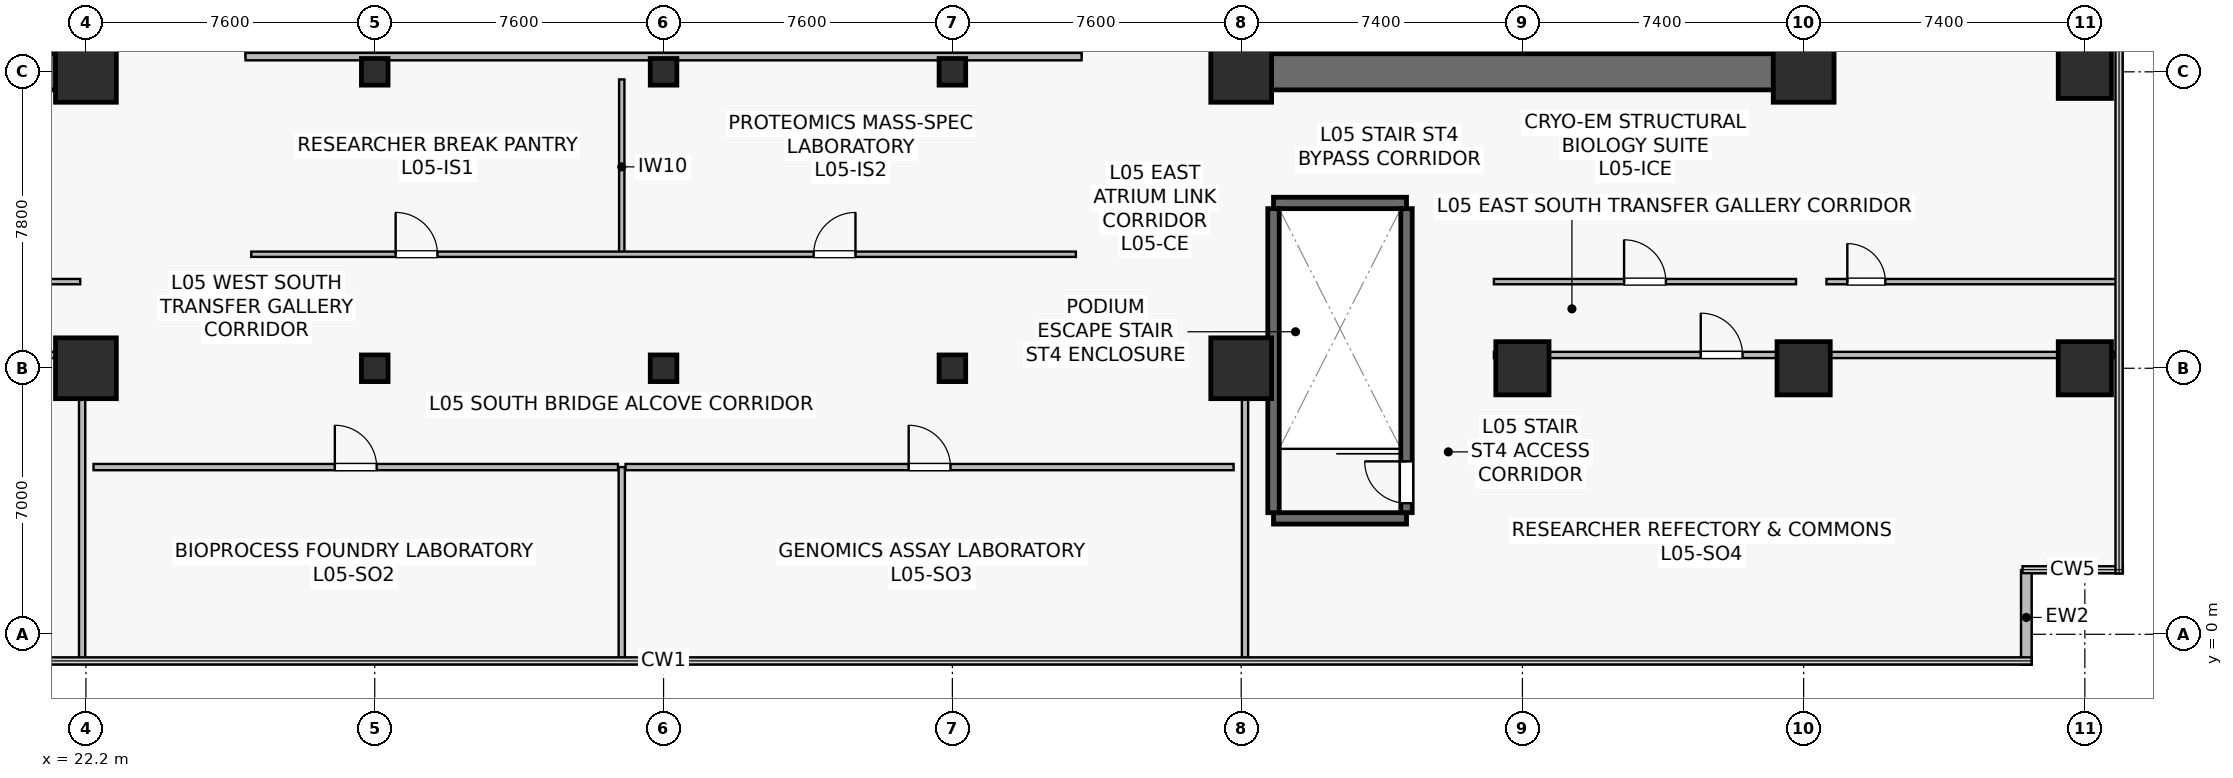
"""IFC4 building model, lengths in metres.
Left out: names, types, materials, properties, quantities, classifications, styles, units other than length and angle.
Written with IfcOpenShell. Run it as: python <this file> out.ifc"""

import sys

from ifc_helpers import new_model, si_unit, direction, frame, frame_2d, origin, origin_2d, place, context, subcontext, project, spatial, rectangle, hollow_rectangle, extrude, source, transform, mapped, element, fill, save


model = new_model("IFC4")
c1 = context("Model", 3, precision=1e-05, world=origin(), true_north=direction((0.0, 1.0)))
c2 = subcontext(c1, "Body", "Model", "MODEL_VIEW")
j1 = project(units=[si_unit("LENGTHUNIT", "METRE"), si_unit("PLANEANGLEUNIT", "RADIAN")], contexts=[c1])
p1 = place(None, origin())
s1 = spatial("IfcSite", under=j1, at=p1, CompositionType="ELEMENT")
p2 = place(p1, origin())
s2 = spatial("IfcBuilding", under=s1, at=p2, CompositionType="ELEMENT")
p3 = place(p2, frame((0.0, 0.0, 19.8)))
s3 = spatial("IfcBuildingStorey", under=s2, at=p3, CompositionType="ELEMENT", Elevation=19.8)
p4 = place(p3, frame((6.925, 14.8, 0.0), z_axis=(0.0, 0.0, 1.0), x_axis=(1.0, 0.0, 0.0)))
e1 = element("IfcWall", 1, at=p4, inside=s3, PredefinedType="SHEAR", context=c2, shape_type="SweptSolid", body=[
    extrude(rectangle(XDim=15.75, YDim=0.95, at=frame_2d((7.875, 0.0))), origin(), (0.0, 0.0, 1.0), 5.08),
])
p5 = place(p3, frame((22.2, 15.275, 0.0), z_axis=(0.0, 0.0, 1.0), x_axis=(0.0, 1.0, 0.0)))
e2 = element("IfcWall", 2, at=p5, inside=s3, PredefinedType="SHEAR", context=c2, shape_type="SweptSolid", body=[
    extrude(rectangle(XDim=18.05, YDim=0.95, at=frame_2d((9.025, 0.0))), origin(), (0.0, 0.0, 1.0), 5.08),
])
p6 = place(p5, frame((3.275, 0.0, 0.0)))
e3 = element("IfcOpeningElement", 3, at=p6, cuts=e2, PredefinedType="OPENING", context=c2, shape_type="SweptSolid", body=[
    extrude(rectangle(XDim=1.42, YDim=2.2, at=frame_2d((0.71, 1.1))), frame((0.0, 0.485, 0.0), z_axis=(0.0, -1.0, 0.0), x_axis=(1.0, 0.0, 0.0)), (0.0, 0.0, 1.0), 0.97),
])
p7 = place(p3, frame((52.125, 14.8, 0.0), z_axis=(0.0, 0.0, 1.0), x_axis=(1.0, 0.0, 0.0)))
e4 = element("IfcWall", 4, at=p7, inside=s3, PredefinedType="SHEAR", context=c2, shape_type="SweptSolid", body=[
    extrude(rectangle(XDim=15.75, YDim=0.95, at=frame_2d((7.875, 0.0))), origin(), (0.0, 0.0, 1.0), 5.08),
])
p8 = place(p3, frame((52.6, 15.275, 0.0), z_axis=(0.0, 0.0, 1.0), x_axis=(0.0, 1.0, 0.0)))
e5 = element("IfcWall", 5, at=p8, inside=s3, PredefinedType="SHEAR", context=c2, shape_type="SweptSolid", body=[
    extrude(rectangle(XDim=18.05, YDim=0.95, at=frame_2d((9.025, 0.0))), origin(), (0.0, 0.0, 1.0), 5.08),
])
p9 = place(p8, frame((3.275, 0.0, 0.0)))
e6 = element("IfcOpeningElement", 6, at=p9, cuts=e5, PredefinedType="OPENING", context=c2, shape_type="SweptSolid", body=[
    extrude(rectangle(XDim=1.42, YDim=2.2, at=frame_2d((0.71, 1.1))), frame((0.0, 0.485, 0.0), z_axis=(0.0, -1.0, 0.0), x_axis=(1.0, 0.0, 0.0)), (0.0, 0.0, 1.0), 0.97),
])
p10 = place(p3, frame((67.4, 15.275, 0.0), z_axis=(0.0, 0.0, 1.0), x_axis=(0.0, 1.0, 0.0)))
e7 = element("IfcWall", 7, at=p10, inside=s3, PredefinedType="SHEAR", context=c2, shape_type="SweptSolid", body=[
    extrude(rectangle(XDim=18.05, YDim=0.95, at=frame_2d((9.025, 0.0))), origin(), (0.0, 0.0, 1.0), 5.08),
])
for number, where, z_axis, x_axis in (
    (8, (53.45, 3.05, 0.0), (0.0, 0.0, 1.0), (1.0, 0.0, 0.0)),
    (9, (53.45, 11.35, 0.0), (0.0, 0.0, 1.0), (1.0, 0.0, 0.0)),
):
    element("IfcWall", number, at=place(p3, frame(where, z_axis=z_axis, x_axis=x_axis)), inside=s3, PredefinedType="SHEAR", context=c2, shape_type="SweptSolid", body=[
        extrude(rectangle(XDim=3.5, YDim=0.3, at=frame_2d((1.75, 0.0))), origin(), (0.0, 0.0, 1.0), 5.08),
    ])
p11 = place(p3, frame((53.45, 3.2, 0.0), z_axis=(0.0, 0.0, 1.0), x_axis=(0.0, 1.0, 0.0)))
e10 = element("IfcWall", 10, at=p11, inside=s3, PredefinedType="SHEAR", context=c2, shape_type="SweptSolid", body=[
    extrude(rectangle(XDim=8.0, YDim=0.3, at=frame_2d((4.0, 0.0))), origin(), (0.0, 0.0, 1.0), 5.08),
])
p12 = place(p3, frame((56.95, 3.2, 0.0), z_axis=(0.0, 0.0, 1.0), x_axis=(0.0, 1.0, 0.0)))
e11 = element("IfcWall", 11, at=p12, inside=s3, PredefinedType="SHEAR", context=c2, shape_type="SweptSolid", body=[
    extrude(rectangle(XDim=8.0, YDim=0.3, at=frame_2d((4.0, 0.0))), origin(), (0.0, 0.0, 1.0), 5.08),
])
p13 = place(p12, frame((0.25, 0.0, 0.0)))
e12 = element("IfcOpeningElement", 12, at=p13, cuts=e11, PredefinedType="OPENING", context=c2, shape_type="SweptSolid", body=[
    extrude(rectangle(XDim=1.1, YDim=2.15, at=frame_2d((0.55, 1.075))), frame((0.0, 0.16, 0.0), z_axis=(0.0, -1.0, 0.0), x_axis=(1.0, 0.0, 0.0)), (0.0, 0.0, 1.0), 0.32),
])
m1 = source(origin(), c2, "Body", "SweptSolid", [
    extrude(rectangle(XDim=1.6, YDim=1.6, at=origin_2d()), origin(), (0.0, 0.0, 1.0), 5.4),
])
for number, where, z_axis, x_axis in (
    (13, (22.2, 7.0, 0.0), (0.0, 0.0, 1.0), (1.0, 0.0, 0.0)),
    (14, (22.2, 14.8, 0.0), (0.0, 0.0, 1.0), (1.0, 0.0, 0.0)),
    (15, (52.6, 7.0, 0.0), (0.0, 0.0, 1.0), (1.0, 0.0, 0.0)),
):
    element("IfcColumn", number, at=place(p3, frame(where, z_axis=z_axis, x_axis=x_axis)), inside=s3, PredefinedType="COLUMN", context=c2, shape_type="MappedRepresentation", body=[
        mapped(m1, transform((0.0, 0.0, 0.0), scale=1.0)),
    ])
m2 = source(origin(), c2, "Body", "SweptSolid", [
    extrude(rectangle(XDim=1.4, YDim=1.4, at=origin_2d()), origin(), (0.0, 0.0, 1.0), 5.4),
])
p14 = place(p3, frame((60.0, 7.0, 0.0), z_axis=(0.0, 0.0, 1.0), x_axis=(1.0, 0.0, 0.0)))
e16 = element("IfcColumn", 16, at=p14, inside=s3, PredefinedType="COLUMN", context=c2, shape_type="MappedRepresentation", body=[
    mapped(m2, transform((0.0, 0.0, 0.0), scale=1.0)),
])
for number, where, z_axis, x_axis in (
    (17, (52.6, 14.8, 0.0), (0.0, 0.0, 1.0), (1.0, 0.0, 0.0)),
    (18, (67.4, 14.8, 0.0), (0.0, 0.0, 1.0), (1.0, 0.0, 0.0)),
):
    element("IfcColumn", number, at=place(p3, frame(where, z_axis=z_axis, x_axis=x_axis)), inside=s3, PredefinedType="COLUMN", context=c2, shape_type="MappedRepresentation", body=[
        mapped(m1, transform((0.0, 0.0, 0.0), scale=1.0)),
    ])
for number, where, z_axis, x_axis in (
    (19, (67.4, 7.0, 0.0), (0.0, 0.0, 1.0), (1.0, 0.0, 0.0)),
    (20, (74.8, 7.0, 0.0), (0.0, 0.0, 1.0), (1.0, 0.0, 0.0)),
    (21, (74.8, 14.8, 0.0), (0.0, 0.0, 1.0), (1.0, 0.0, 0.0)),
):
    element("IfcColumn", number, at=place(p3, frame(where, z_axis=z_axis, x_axis=x_axis)), inside=s3, PredefinedType="COLUMN", context=c2, shape_type="MappedRepresentation", body=[
        mapped(m2, transform((0.0, 0.0, 0.0), scale=1.0)),
    ])
m3 = source(origin(), c2, "Body", "SweptSolid", [
    extrude(hollow_rectangle(XDim=0.7, YDim=0.7, WallThickness=0.032, at=origin_2d()), origin(), (0.0, 0.0, 1.0), 5.4),
])
for number, where, z_axis, x_axis in (
    (22, (29.8, 7.0, 0.0), (0.0, 0.0, 1.0), (1.0, 0.0, 0.0)),
    (23, (29.8, 14.8, 0.0), (0.0, 0.0, 1.0), (1.0, 0.0, 0.0)),
    (24, (37.4, 7.0, 0.0), (0.0, 0.0, 1.0), (1.0, 0.0, 0.0)),
    (25, (37.4, 14.8, 0.0), (0.0, 0.0, 1.0), (1.0, 0.0, 0.0)),
    (26, (45.0, 7.0, 0.0), (0.0, 0.0, 1.0), (1.0, 0.0, 0.0)),
    (27, (45.0, 14.8, 0.0), (0.0, 0.0, 1.0), (1.0, 0.0, 0.0)),
):
    element("IfcColumn", number, at=place(p3, frame(where, z_axis=z_axis, x_axis=x_axis)), inside=s3, PredefinedType="COLUMN", context=c2, shape_type="MappedRepresentation", body=[
        mapped(m3, transform((0.0, 0.0, 0.0), scale=1.0)),
    ])
p15 = place(p3, frame((73.26, -0.8, 0.0), z_axis=(0.0, 0.0, 1.0), x_axis=(0.0, 1.0, 0.0)))
e28 = element("IfcWall", 28, at=p15, inside=s3, PredefinedType="STANDARD", context=c2, shape_type="SweptSolid", body=[
    extrude(rectangle(XDim=2.488, YDim=0.28, at=frame_2d((1.244, 0.0))), origin(), (0.0, 0.0, 1.0), 5.08),
])
p16 = place(p3, frame((26.5, 15.2, 0.0), z_axis=(0.0, 0.0, 1.0), x_axis=(0.0, 1.0, 0.0)))
e29 = element("IfcWall", 29, at=p16, inside=s3, PredefinedType="SOLIDWALL", context=c2, shape_type="SweptSolid", body=[
    extrude(rectangle(XDim=18.2, YDim=0.195, at=frame_2d((9.1, 0.0))), origin(), (0.0, 0.0, 1.0), 5.08),
])
p17 = place(p16, frame((1.8, 0.0, 0.9)))
e30 = element("IfcOpeningElement", 30, at=p17, cuts=e29, PredefinedType="OPENING", context=c2, shape_type="SweptSolid", body=[
    extrude(rectangle(XDim=1.2, YDim=1.35, at=frame_2d((0.6, 0.675))), frame((0.0, 0.107, 0.0), z_axis=(0.0, -1.0, 0.0), x_axis=(1.0, 0.0, 0.0)), (0.0, 0.0, 1.0), 0.215),
])
p18 = place(p16, frame((13.2, 0.0, 0.9)))
e31 = element("IfcOpeningElement", 31, at=p18, cuts=e29, PredefinedType="OPENING", context=c2, shape_type="SweptSolid", body=[
    extrude(rectangle(XDim=1.2, YDim=1.35, at=frame_2d((0.6, 0.675))), frame((0.0, 0.107, 0.0), z_axis=(0.0, -1.0, 0.0), x_axis=(1.0, 0.0, 0.0)), (0.0, 0.0, 1.0), 0.215),
])
p19 = place(p3, frame((48.3, 15.2, 0.0), z_axis=(0.0, 0.0, 1.0), x_axis=(0.0, 1.0, 0.0)))
e32 = element("IfcWall", 32, at=p19, inside=s3, PredefinedType="SOLIDWALL", context=c2, shape_type="SweptSolid", body=[
    extrude(rectangle(XDim=18.2, YDim=0.195, at=frame_2d((9.1, 0.0))), origin(), (0.0, 0.0, 1.0), 5.08),
])
p20 = place(p19, frame((1.8, 0.0, 0.9)))
e33 = element("IfcOpeningElement", 33, at=p20, cuts=e32, PredefinedType="OPENING", context=c2, shape_type="SweptSolid", body=[
    extrude(rectangle(XDim=1.2, YDim=1.35, at=frame_2d((0.6, 0.675))), frame((0.0, 0.107, 0.0), z_axis=(0.0, -1.0, 0.0), x_axis=(1.0, 0.0, 0.0)), (0.0, 0.0, 1.0), 0.215),
])
p21 = place(p19, frame((13.2, 0.0, 0.9)))
e34 = element("IfcOpeningElement", 34, at=p21, cuts=e32, PredefinedType="OPENING", context=c2, shape_type="SweptSolid", body=[
    extrude(rectangle(XDim=1.2, YDim=1.35, at=frame_2d((0.6, 0.675))), frame((0.0, 0.107, 0.0), z_axis=(0.0, -1.0, 0.0), x_axis=(1.0, 0.0, 0.0)), (0.0, 0.0, 1.0), 0.215),
])
p22 = place(p3, frame((26.4, 15.2, 0.0), z_axis=(0.0, 0.0, 1.0), x_axis=(1.0, 0.0, 0.0)))
e35 = element("IfcWall", 35, at=p22, inside=s3, PredefinedType="SOLIDWALL", context=c2, shape_type="SweptSolid", body=[
    extrude(rectangle(XDim=22.0, YDim=0.195, at=frame_2d((11.0, 0.0))), origin(), (0.0, 0.0, 1.0), 5.08),
])
p23 = place(p3, frame((6.6, 7.35, 0.0), z_axis=(0.0, 0.0, 1.0), x_axis=(1.0, 0.0, 0.0)))
e36 = element("IfcWall", 36, at=p23, inside=s3, PredefinedType="PARTITIONING", context=c2, shape_type="SweptSolid", body=[
    extrude(rectangle(XDim=15.2, YDim=0.165, at=frame_2d((7.6, 0.0))), origin(), (0.0, 0.0, 1.0), 4.365),
])
p24 = place(p23, frame((5.04, 0.0, 0.0)))
e37 = element("IfcOpeningElement", 37, at=p24, cuts=e36, PredefinedType="OPENING", context=c2, shape_type="SweptSolid", body=[
    extrude(rectangle(XDim=1.1, YDim=2.18, at=frame_2d((0.55, 1.09))), frame((0.0, 0.093, 0.0), z_axis=(0.0, -1.0, 0.0), x_axis=(1.0, 0.0, 0.0)), (0.0, 0.0, 1.0), 0.185),
])
p25 = place(p3, frame((22.4, 4.4, 0.0), z_axis=(0.0, 0.0, 1.0), x_axis=(1.0, 0.0, 0.0)))
e38 = element("IfcWall", 38, at=p25, inside=s3, PredefinedType="PARTITIONING", context=c2, shape_type="SweptSolid", body=[
    extrude(rectangle(XDim=13.8, YDim=0.165, at=frame_2d((6.9, 0.0))), origin(), (0.0, 0.0, 1.0), 5.08),
])
p26 = place(p25, frame((6.35, 0.0, 0.0)))
e39 = element("IfcOpeningElement", 39, at=p26, cuts=e38, PredefinedType="OPENING", context=c2, shape_type="SweptSolid", body=[
    extrude(rectangle(XDim=1.1, YDim=2.18, at=frame_2d((0.55, 1.09))), frame((0.0, 0.093, 0.0), z_axis=(0.0, -1.0, 0.0), x_axis=(1.0, 0.0, 0.0)), (0.0, 0.0, 1.0), 0.185),
])
p27 = place(p3, frame((36.4, 4.4, 0.0), z_axis=(0.0, 0.0, 1.0), x_axis=(1.0, 0.0, 0.0)))
e40 = element("IfcWall", 40, at=p27, inside=s3, PredefinedType="PARTITIONING", context=c2, shape_type="SweptSolid", body=[
    extrude(rectangle(XDim=16.0, YDim=0.165, at=frame_2d((8.0, 0.0))), origin(), (0.0, 0.0, 1.0), 5.08),
])
p28 = place(p27, frame((7.45, 0.0, 0.0)))
e41 = element("IfcOpeningElement", 41, at=p28, cuts=e40, PredefinedType="OPENING", context=c2, shape_type="SweptSolid", body=[
    extrude(rectangle(XDim=1.1, YDim=2.18, at=frame_2d((0.55, 1.09))), frame((0.0, 0.093, 0.0), z_axis=(0.0, -1.0, 0.0), x_axis=(1.0, 0.0, 0.0)), (0.0, 0.0, 1.0), 0.185),
])
p29 = place(p3, frame((59.25, 7.35, 0.0), z_axis=(0.0, 0.0, 1.0), x_axis=(1.0, 0.0, 0.0)))
e42 = element("IfcWall", 42, at=p29, inside=s3, PredefinedType="PARTITIONING", context=c2, shape_type="SweptSolid", body=[
    extrude(rectangle(XDim=16.35, YDim=0.165, at=frame_2d((8.175, 0.0))), origin(), (0.0, 0.0, 1.0), 4.365),
])
p30 = place(p29, frame((5.442, 0.0, 0.0)))
e43 = element("IfcOpeningElement", 43, at=p30, cuts=e42, PredefinedType="OPENING", context=c2, shape_type="SweptSolid", body=[
    extrude(rectangle(XDim=1.1, YDim=2.18, at=frame_2d((0.55, 1.09))), frame((0.0, 0.093, 0.0), z_axis=(0.0, -1.0, 0.0), x_axis=(1.0, 0.0, 0.0)), (0.0, 0.0, 1.0), 0.185),
])
p31 = place(p3, frame((22.1, -0.68, 0.0), z_axis=(0.0, 0.0, 1.0), x_axis=(0.0, 1.0, 0.0)))
e44 = element("IfcWall", 44, at=p31, inside=s3, PredefinedType="PARTITIONING", context=c2, shape_type="SweptSolid", body=[
    extrude(rectangle(XDim=8.03, YDim=0.165, at=frame_2d((4.015, 0.0))), origin(), (0.0, 0.0, 1.0), 4.165),
])
p32 = place(p3, frame((36.3, -0.68, 0.0), z_axis=(0.0, 0.0, 1.0), x_axis=(0.0, 1.0, 0.0)))
e45 = element("IfcWall", 45, at=p32, inside=s3, PredefinedType="PARTITIONING", context=c2, shape_type="SweptSolid", body=[
    extrude(rectangle(XDim=5.08, YDim=0.165, at=frame_2d((2.54, 0.0))), origin(), (0.0, 0.0, 1.0), 5.08),
])
p33 = place(p3, frame((52.7, -0.68, 0.0), z_axis=(0.0, 0.0, 1.0), x_axis=(0.0, 1.0, 0.0)))
e46 = element("IfcWall", 46, at=p33, inside=s3, PredefinedType="PARTITIONING", context=c2, shape_type="SweptSolid", body=[
    extrude(rectangle(XDim=8.03, YDim=0.165, at=frame_2d((4.015, 0.0))), origin(), (0.0, 0.0, 1.0), 4.165),
])
p34 = place(p3, frame((36.3, 10.0, 0.0), z_axis=(0.0, 0.0, 1.0), x_axis=(0.0, 1.0, 0.0)))
e47 = element("IfcWall", 47, at=p34, inside=s3, PredefinedType="PARTITIONING", context=c2, shape_type="SweptSolid", body=[
    extrude(rectangle(XDim=4.6, YDim=0.14, at=frame_2d((2.3, 0.0))), origin(), (0.0, 0.0, 1.0), 4.165),
])
p35 = place(p3, frame((26.55, 10.0, 0.0), z_axis=(0.0, 0.0, 1.0), x_axis=(1.0, 0.0, 0.0)))
e48 = element("IfcWall", 48, at=p35, inside=s3, PredefinedType="PARTITIONING", context=c2, shape_type="SweptSolid", body=[
    extrude(rectangle(XDim=21.7, YDim=0.14, at=frame_2d((10.85, 0.0))), origin(), (0.0, 0.0, 1.0), 4.365),
])
p36 = place(p35, frame((3.8, 0.0, 0.0)))
e49 = element("IfcOpeningElement", 49, at=p36, cuts=e48, PredefinedType="OPENING", context=c2, shape_type="SweptSolid", body=[
    extrude(rectangle(XDim=1.1, YDim=2.18, at=frame_2d((0.55, 1.09))), frame((0.0, 0.08, 0.0), z_axis=(0.0, -1.0, 0.0), x_axis=(1.0, 0.0, 0.0)), (0.0, 0.0, 1.0), 0.16),
])
p37 = place(p35, frame((14.8, 0.0, 0.0)))
e50 = element("IfcOpeningElement", 50, at=p37, cuts=e48, PredefinedType="OPENING", context=c2, shape_type="SweptSolid", body=[
    extrude(rectangle(XDim=1.1, YDim=2.18, at=frame_2d((0.55, 1.09))), frame((0.0, 0.08, 0.0), z_axis=(0.0, -1.0, 0.0), x_axis=(1.0, 0.0, 0.0)), (0.0, 0.0, 1.0), 0.16),
])
p38 = place(p3, frame((7.6, 9.28, 0.0), z_axis=(0.0, 0.0, 1.0), x_axis=(1.0, 0.0, 0.0)))
e51 = element("IfcWall", 51, at=p38, inside=s3, PredefinedType="PARTITIONING", context=c2, shape_type="SweptSolid", body=[
    extrude(rectangle(XDim=14.45, YDim=0.14, at=frame_2d((7.225, 0.0))), origin(), (0.0, 0.0, 1.0), 4.365),
])
p39 = place(p38, frame((6.675, 0.0, 0.0)))
e52 = element("IfcOpeningElement", 52, at=p39, cuts=e51, PredefinedType="OPENING", context=c2, shape_type="SweptSolid", body=[
    extrude(rectangle(XDim=1.1, YDim=2.18, at=frame_2d((0.55, 1.09))), frame((0.0, 0.08, 0.0), z_axis=(0.0, -1.0, 0.0), x_axis=(1.0, 0.0, 0.0)), (0.0, 0.0, 1.0), 0.16),
])
p40 = place(p3, frame((59.25, 9.28, 0.0), z_axis=(0.0, 0.0, 1.0), x_axis=(1.0, 0.0, 0.0)))
e53 = element("IfcWall", 53, at=p40, inside=s3, PredefinedType="PARTITIONING", context=c2, shape_type="SweptSolid", body=[
    extrude(rectangle(XDim=7.95, YDim=0.14, at=frame_2d((3.975, 0.0))), origin(), (0.0, 0.0, 1.0), 4.365),
])
p41 = place(p40, frame((3.425, 0.0, 0.0)))
e54 = element("IfcOpeningElement", 54, at=p41, cuts=e53, PredefinedType="OPENING", context=c2, shape_type="SweptSolid", body=[
    extrude(rectangle(XDim=1.1, YDim=2.18, at=frame_2d((0.55, 1.09))), frame((0.0, 0.08, 0.0), z_axis=(0.0, -1.0, 0.0), x_axis=(1.0, 0.0, 0.0)), (0.0, 0.0, 1.0), 0.16),
])
p42 = place(p3, frame((68.0, 9.28, 0.0), z_axis=(0.0, 0.0, 1.0), x_axis=(1.0, 0.0, 0.0)))
e55 = element("IfcWall", 55, at=p42, inside=s3, PredefinedType="PARTITIONING", context=c2, shape_type="SweptSolid", body=[
    extrude(rectangle(XDim=7.65, YDim=0.14, at=frame_2d((3.825, 0.0))), origin(), (0.0, 0.0, 1.0), 4.465),
])
p43 = place(p42, frame((0.55, 0.0, 0.0)))
e56 = element("IfcOpeningElement", 56, at=p43, cuts=e55, PredefinedType="OPENING", context=c2, shape_type="SweptSolid", body=[
    extrude(rectangle(XDim=1.0, YDim=2.15, at=frame_2d((0.5, 1.075))), frame((0.0, 0.08, 0.0), z_axis=(0.0, -1.0, 0.0), x_axis=(1.0, 0.0, 0.0)), (0.0, 0.0, 1.0), 0.16),
])
m4 = source(origin(), c2, "Body", "SweptSolid", [
    extrude(rectangle(XDim=1.1, YDim=2.15, at=frame_2d((0.55, 1.075))), frame((0.0, 0.025, 0.0), z_axis=(0.0, -1.0, 0.0), x_axis=(1.0, 0.0, 0.0)), (0.0, 0.0, 1.0), 0.05),
])
p44 = place(p13, origin())
e57 = element("IfcDoor", 57, at=p44, inside=s3, OperationType="SINGLE_SWING_RIGHT", PredefinedType="DOOR", context=c2, shape_type="MappedRepresentation", body=[
    mapped(m4, transform((0.0, 0.0, 0.0), scale=1.0)),
])
fill(e12, e57)
m5 = source(origin(), c2, "Body", "SweptSolid", [
    extrude(rectangle(XDim=1.1, YDim=2.18, at=frame_2d((0.55, 1.09))), frame((0.0, 0.025, 0.0), z_axis=(0.0, -1.0, 0.0), x_axis=(1.0, 0.0, 0.0)), (0.0, 0.0, 1.0), 0.05),
])
p45 = place(p26, origin())
e58 = element("IfcDoor", 58, at=p45, inside=s3, OperationType="SINGLE_SWING_LEFT", PredefinedType="DOOR", context=c2, shape_type="MappedRepresentation", body=[
    mapped(m5, transform((0.0, 0.0, 0.0), scale=1.0)),
])
fill(e39, e58)
p46 = place(p28, origin())
e59 = element("IfcDoor", 59, at=p46, inside=s3, OperationType="SINGLE_SWING_LEFT", PredefinedType="DOOR", context=c2, shape_type="MappedRepresentation", body=[
    mapped(m5, transform((0.0, 0.0, 0.0), scale=1.0)),
])
fill(e41, e59)
p47 = place(p30, origin())
e60 = element("IfcDoor", 60, at=p47, inside=s3, OperationType="SINGLE_SWING_LEFT", PredefinedType="DOOR", context=c2, shape_type="MappedRepresentation", body=[
    mapped(m5, transform((0.0, 0.0, 0.0), scale=1.0)),
])
fill(e43, e60)
p48 = place(p36, origin())
e61 = element("IfcDoor", 61, at=p48, inside=s3, OperationType="SINGLE_SWING_LEFT", PredefinedType="DOOR", context=c2, shape_type="MappedRepresentation", body=[
    mapped(m5, transform((0.0, 0.0, 0.0), scale=1.0)),
])
fill(e49, e61)
p49 = place(p37, origin())
e62 = element("IfcDoor", 62, at=p49, inside=s3, OperationType="SINGLE_SWING_RIGHT", PredefinedType="DOOR", context=c2, shape_type="MappedRepresentation", body=[
    mapped(m5, transform((0.0, 0.0, 0.0), scale=1.0)),
])
fill(e50, e62)
p50 = place(p41, origin())
e63 = element("IfcDoor", 63, at=p50, inside=s3, OperationType="SINGLE_SWING_LEFT", PredefinedType="DOOR", context=c2, shape_type="MappedRepresentation", body=[
    mapped(m5, transform((0.0, 0.0, 0.0), scale=1.0)),
])
fill(e54, e63)
m6 = source(origin(), c2, "Body", "SweptSolid", [
    extrude(rectangle(XDim=1.0, YDim=2.15, at=frame_2d((0.5, 1.075))), frame((0.0, 0.025, 0.0), z_axis=(0.0, -1.0, 0.0), x_axis=(1.0, 0.0, 0.0)), (0.0, 0.0, 1.0), 0.05),
])
p51 = place(p43, origin())
e64 = element("IfcDoor", 64, at=p51, inside=s3, OperationType="SINGLE_SWING_LEFT", PredefinedType="DOOR", context=c2, shape_type="MappedRepresentation", body=[
    mapped(m6, transform((0.0, 0.0, 0.0), scale=1.0)),
])
fill(e56, e64)
save(model, sys.argv[1])
